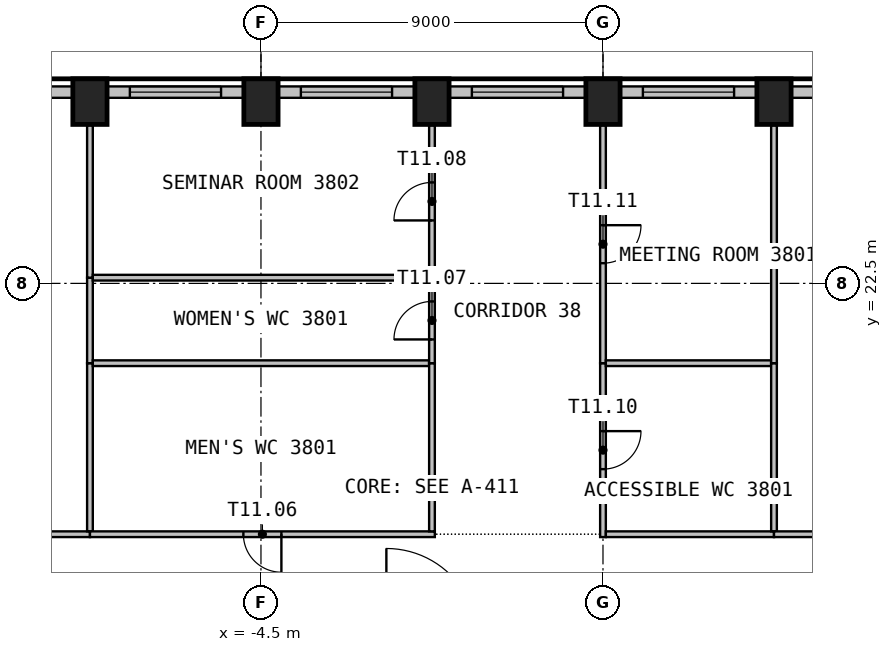
"""IFC4 building model, lengths in metres.
Left out: names, types, materials, properties, quantities, classifications, styles, units other than length and angle.
Written with IfcOpenShell. Run it as: python <this file> out.ifc"""

import sys

from ifc_helpers import new_model, si_unit, direction, frame, frame_2d, origin, origin_2d, place, context, subcontext, project, spatial, rectangle, extrude, element, fill, save


model = new_model("IFC4")
c1 = context("Model", 3, precision=1e-05, world=origin(), true_north=direction((0.0, 1.0)))
c2 = subcontext(c1, "Body", "Model", "MODEL_VIEW")
j1 = project(units=[si_unit("LENGTHUNIT", "METRE"), si_unit("PLANEANGLEUNIT", "RADIAN")], contexts=[c1])
p1 = place(None, origin())
s1 = spatial("IfcSite", under=j1, at=p1, CompositionType="ELEMENT")
p2 = place(p1, origin())
s2 = spatial("IfcBuilding", under=s1, at=p2, CompositionType="ELEMENT")
p3 = place(p2, frame((0.0, 0.0, 156.0)))
s3 = spatial("IfcBuildingStorey", under=s2, at=p3, CompositionType="ELEMENT", Elevation=156.0)
for number, where, z_axis, x_axis in (
    (1, (9.0, 27.283, 0.0), (0.0, 0.0, 1.0), (-1.0, 0.0, 0.0)),
    (2, (4.5, 27.283, 0.0), (0.0, 0.0, 1.0), (-1.0, 0.0, 0.0)),
    (3, (0.0, 27.283, 0.0), (0.0, 0.0, 1.0), (-1.0, 0.0, 0.0)),
    (4, (-4.5, 27.283, 0.0), (0.0, 0.0, 1.0), (-1.0, 0.0, 0.0)),
    (5, (-9.0, 27.283, 0.0), (0.0, 0.0, 1.0), (-1.0, 0.0, 0.0)),
):
    element("IfcColumn", number, at=place(p3, frame(where, z_axis=z_axis, x_axis=x_axis)), inside=s3, PredefinedType="COLUMN", context=c2, shape_type="SweptSolid", body=[
        extrude(rectangle(XDim=0.9, YDim=1.2, at=origin_2d()), origin(), (0.0, 0.0, 1.0), 3.575),
    ])
p4 = place(p3, frame((13.05, 27.533, 0.0), z_axis=(0.0, 0.0, 1.0), x_axis=(-1.0, 0.0, 0.0)))
e6 = element("IfcWall", 6, at=p4, inside=s3, PredefinedType="SOLIDWALL", context=c2, shape_type="SweptSolid", body=[
    extrude(rectangle(XDim=3.599, YDim=0.3, at=frame_2d((1.8, 0.0))), origin(), (0.0, 0.0, 1.0), 3.575),
])
p5 = place(p4, frame((0.6, 0.0, 0.9)))
e7 = element("IfcOpeningElement", 7, at=p5, cuts=e6, PredefinedType="OPENING", context=c2, shape_type="SweptSolid", body=[
    extrude(rectangle(XDim=2.4, YDim=2.1, at=frame_2d((1.2, 1.05))), frame((0.0, 0.16, 0.0), z_axis=(0.0, -1.0, 0.0), x_axis=(1.0, 0.0, 0.0)), (0.0, 0.0, 1.0), 0.32),
])
p6 = place(p3, frame((8.55, 27.533, 0.0), z_axis=(0.0, 0.0, 1.0), x_axis=(-1.0, 0.0, 0.0)))
e8 = element("IfcWall", 8, at=p6, inside=s3, PredefinedType="SOLIDWALL", context=c2, shape_type="SweptSolid", body=[
    extrude(rectangle(XDim=3.599, YDim=0.3, at=frame_2d((1.8, 0.0))), origin(), (0.0, 0.0, 1.0), 3.575),
])
p7 = place(p6, frame((0.6, 0.0, 0.9)))
e9 = element("IfcOpeningElement", 9, at=p7, cuts=e8, PredefinedType="OPENING", context=c2, shape_type="SweptSolid", body=[
    extrude(rectangle(XDim=2.4, YDim=2.1, at=frame_2d((1.2, 1.05))), frame((0.0, 0.16, 0.0), z_axis=(0.0, -1.0, 0.0), x_axis=(1.0, 0.0, 0.0)), (0.0, 0.0, 1.0), 0.32),
])
p8 = place(p3, frame((4.05, 27.533, 0.0), z_axis=(0.0, 0.0, 1.0), x_axis=(-1.0, 0.0, 0.0)))
e10 = element("IfcWall", 10, at=p8, inside=s3, PredefinedType="SOLIDWALL", context=c2, shape_type="SweptSolid", body=[
    extrude(rectangle(XDim=3.599, YDim=0.3, at=frame_2d((1.8, 0.0))), origin(), (0.0, 0.0, 1.0), 3.575),
])
p9 = place(p8, frame((0.6, 0.0, 0.9)))
e11 = element("IfcOpeningElement", 11, at=p9, cuts=e10, PredefinedType="OPENING", context=c2, shape_type="SweptSolid", body=[
    extrude(rectangle(XDim=2.4, YDim=2.1, at=frame_2d((1.2, 1.05))), frame((0.0, 0.16, 0.0), z_axis=(0.0, -1.0, 0.0), x_axis=(1.0, 0.0, 0.0)), (0.0, 0.0, 1.0), 0.32),
])
p10 = place(p3, frame((-0.45, 27.533, 0.0), z_axis=(0.0, 0.0, 1.0), x_axis=(-1.0, 0.0, 0.0)))
e12 = element("IfcWall", 12, at=p10, inside=s3, PredefinedType="SOLIDWALL", context=c2, shape_type="SweptSolid", body=[
    extrude(rectangle(XDim=3.599, YDim=0.3, at=frame_2d((1.8, 0.0))), origin(), (0.0, 0.0, 1.0), 3.575),
])
p11 = place(p10, frame((0.6, 0.0, 0.9)))
e13 = element("IfcOpeningElement", 13, at=p11, cuts=e12, PredefinedType="OPENING", context=c2, shape_type="SweptSolid", body=[
    extrude(rectangle(XDim=2.4, YDim=2.1, at=frame_2d((1.2, 1.05))), frame((0.0, 0.16, 0.0), z_axis=(0.0, -1.0, 0.0), x_axis=(1.0, 0.0, 0.0)), (0.0, 0.0, 1.0), 0.32),
])
p12 = place(p3, frame((-4.95, 27.533, 0.0), z_axis=(0.0, 0.0, 1.0), x_axis=(-1.0, 0.0, 0.0)))
e14 = element("IfcWall", 14, at=p12, inside=s3, PredefinedType="SOLIDWALL", context=c2, shape_type="SweptSolid", body=[
    extrude(rectangle(XDim=3.599, YDim=0.3, at=frame_2d((1.8, 0.0))), origin(), (0.0, 0.0, 1.0), 3.575),
])
p13 = place(p12, frame((0.6, 0.0, 0.9)))
e15 = element("IfcOpeningElement", 15, at=p13, cuts=e14, PredefinedType="OPENING", context=c2, shape_type="SweptSolid", body=[
    extrude(rectangle(XDim=2.4, YDim=2.1, at=frame_2d((1.2, 1.05))), frame((0.0, 0.16, 0.0), z_axis=(0.0, -1.0, 0.0), x_axis=(1.0, 0.0, 0.0)), (0.0, 0.0, 1.0), 0.32),
])
p14 = place(p3, frame((-9.45, 27.533, 0.0), z_axis=(0.0, 0.0, 1.0), x_axis=(-1.0, 0.0, 0.0)))
e16 = element("IfcWall", 16, at=p14, inside=s3, PredefinedType="SOLIDWALL", context=c2, shape_type="SweptSolid", body=[
    extrude(rectangle(XDim=3.599, YDim=0.3, at=frame_2d((1.8, 0.0))), origin(), (0.0, 0.0, 1.0), 3.575),
])
p15 = place(p14, frame((0.6, 0.0, 0.9)))
e17 = element("IfcOpeningElement", 17, at=p15, cuts=e16, PredefinedType="OPENING", context=c2, shape_type="SweptSolid", body=[
    extrude(rectangle(XDim=2.4, YDim=2.1, at=frame_2d((1.2, 1.05))), frame((0.0, 0.16, 0.0), z_axis=(0.0, -1.0, 0.0), x_axis=(1.0, 0.0, 0.0)), (0.0, 0.0, 1.0), 0.32),
])
p16 = place(p3, frame((-9.0, 15.9, 0.0), z_axis=(0.0, 0.0, 1.0), x_axis=(-1.0, 0.0, 0.0)))
e18 = element("IfcWall", 18, at=p16, inside=s3, PredefinedType="PARTITIONING", context=c2, shape_type="SweptSolid", body=[
    extrude(rectangle(XDim=5.04, YDim=0.15, at=frame_2d((2.52, 0.0))), origin(), (0.0, 0.0, 1.0), 3.575),
])
p17 = place(p16, frame((2.02, 0.0, 0.0)))
e19 = element("IfcOpeningElement", 19, at=p17, cuts=e18, PredefinedType="OPENING", context=c2, shape_type="SweptSolid", body=[
    extrude(rectangle(XDim=1.0, YDim=2.1, at=frame_2d((0.5, 1.05))), frame((0.0, 0.085, 0.0), z_axis=(0.0, -1.0, 0.0), x_axis=(1.0, 0.0, 0.0)), (0.0, 0.0, 1.0), 0.17),
])
p18 = place(p3, frame((-9.0, 20.4, 0.0), z_axis=(0.0, 0.0, 1.0), x_axis=(0.0, -1.0, 0.0)))
e20 = element("IfcWall", 20, at=p18, inside=s3, PredefinedType="PARTITIONING", context=c2, shape_type="SweptSolid", body=[
    extrude(rectangle(XDim=4.425, YDim=0.15, at=frame_2d((2.212, 0.0))), origin(), (0.0, 0.0, 1.0), 3.575),
])
p19 = place(p3, frame((0.075, 15.9, 0.0), z_axis=(0.0, 0.0, 1.0), x_axis=(-1.0, 0.0, 0.0)))
e21 = element("IfcWall", 21, at=p19, inside=s3, PredefinedType="PARTITIONING", context=c2, shape_type="SweptSolid", body=[
    extrude(rectangle(XDim=9.075, YDim=0.15, at=frame_2d((4.538, 0.0))), origin(), (0.0, 0.0, 1.0), 3.575),
])
p20 = place(p19, frame((4.038, 0.0, 0.0)))
e22 = element("IfcOpeningElement", 22, at=p20, cuts=e21, PredefinedType="OPENING", context=c2, shape_type="SweptSolid", body=[
    extrude(rectangle(XDim=1.0, YDim=2.1, at=frame_2d((0.5, 1.05))), frame((0.0, 0.085, 0.0), z_axis=(0.0, -1.0, 0.0), x_axis=(1.0, 0.0, 0.0)), (0.0, 0.0, 1.0), 0.17),
])
p21 = place(p3, frame((-9.0, 22.65, 0.0), z_axis=(0.0, 0.0, 1.0), x_axis=(0.0, -1.0, 0.0)))
e23 = element("IfcWall", 23, at=p21, inside=s3, PredefinedType="PARTITIONING", context=c2, shape_type="SweptSolid", body=[
    extrude(rectangle(XDim=2.25, YDim=0.15, at=frame_2d((1.125, 0.0))), origin(), (0.0, 0.0, 1.0), 3.575),
])
p22 = place(p3, frame((-8.925, 20.4, 0.0), z_axis=(0.0, 0.0, 1.0), x_axis=(1.0, 0.0, 0.0)))
e24 = element("IfcWall", 24, at=p22, inside=s3, PredefinedType="PARTITIONING", context=c2, shape_type="SweptSolid", body=[
    extrude(rectangle(XDim=8.85, YDim=0.15, at=frame_2d((4.425, 0.0))), origin(), (0.0, 0.0, 1.0), 3.575),
])
p23 = place(p3, frame((-9.0, 26.663, 0.0), z_axis=(0.0, 0.0, 1.0), x_axis=(0.0, -1.0, 0.0)))
e25 = element("IfcWall", 25, at=p23, inside=s3, PredefinedType="MOVABLE", context=c2, shape_type="SweptSolid", body=[
    extrude(rectangle(XDim=4.013, YDim=0.15, at=frame_2d((2.006, 0.0))), origin(), (0.0, 0.0, 1.0), 3.575),
])
p24 = place(p3, frame((-8.925, 22.65, 0.0), z_axis=(0.0, 0.0, 1.0), x_axis=(1.0, 0.0, 0.0)))
e26 = element("IfcWall", 26, at=p24, inside=s3, PredefinedType="PARTITIONING", context=c2, shape_type="SweptSolid", body=[
    extrude(rectangle(XDim=8.85, YDim=0.15, at=frame_2d((4.425, 0.0))), origin(), (0.0, 0.0, 1.0), 3.575),
])
p25 = place(p3, frame((0.0, 15.975, 0.0), z_axis=(0.0, 0.0, 1.0), x_axis=(0.0, 1.0, 0.0)))
e27 = element("IfcWall", 27, at=p25, inside=s3, PredefinedType="PARTITIONING", context=c2, shape_type="SweptSolid", body=[
    extrude(rectangle(XDim=4.425, YDim=0.15, at=frame_2d((2.212, 0.0))), origin(), (0.0, 0.0, 1.0), 3.575),
])
p26 = place(p3, frame((0.0, 20.4, 0.0), z_axis=(0.0, 0.0, 1.0), x_axis=(0.0, 1.0, 0.0)))
e28 = element("IfcWall", 28, at=p26, inside=s3, PredefinedType="PARTITIONING", context=c2, shape_type="SweptSolid", body=[
    extrude(rectangle(XDim=2.25, YDim=0.15, at=frame_2d((1.125, 0.0))), origin(), (0.0, 0.0, 1.0), 3.575),
])
p27 = place(p26, frame((0.625, 0.0, 0.0)))
e29 = element("IfcOpeningElement", 29, at=p27, cuts=e28, PredefinedType="OPENING", context=c2, shape_type="SweptSolid", body=[
    extrude(rectangle(XDim=1.0, YDim=2.1, at=frame_2d((0.5, 1.05))), frame((0.0, 0.085, 0.0), z_axis=(0.0, -1.0, 0.0), x_axis=(1.0, 0.0, 0.0)), (0.0, 0.0, 1.0), 0.17),
])
p28 = place(p3, frame((0.0, 22.65, 0.0), z_axis=(0.0, 0.0, 1.0), x_axis=(0.0, 1.0, 0.0)))
e30 = element("IfcWall", 30, at=p28, inside=s3, PredefinedType="PARTITIONING", context=c2, shape_type="SweptSolid", body=[
    extrude(rectangle(XDim=4.013, YDim=0.15, at=frame_2d((2.006, 0.0))), origin(), (0.0, 0.0, 1.0), 3.575),
])
p29 = place(p28, frame((1.506, 0.0, 0.0)))
e31 = element("IfcOpeningElement", 31, at=p29, cuts=e30, PredefinedType="OPENING", context=c2, shape_type="SweptSolid", body=[
    extrude(rectangle(XDim=1.0, YDim=2.1, at=frame_2d((0.5, 1.05))), frame((0.0, 0.085, 0.0), z_axis=(0.0, -1.0, 0.0), x_axis=(1.0, 0.0, 0.0)), (0.0, 0.0, 1.0), 0.17),
])
p30 = place(p3, frame((4.5, 20.4, 0.0), z_axis=(0.0, 0.0, 1.0), x_axis=(0.0, -1.0, 0.0)))
e32 = element("IfcWall", 32, at=p30, inside=s3, PredefinedType="PARTITIONING", context=c2, shape_type="SweptSolid", body=[
    extrude(rectangle(XDim=4.575, YDim=0.15, at=frame_2d((2.288, 0.0))), origin(), (0.0, 0.0, 1.0), 3.575),
])
p31 = place(p30, frame((1.788, 0.0, 0.0)))
e33 = element("IfcOpeningElement", 33, at=p31, cuts=e32, PredefinedType="OPENING", context=c2, shape_type="SweptSolid", body=[
    extrude(rectangle(XDim=1.0, YDim=2.1, at=frame_2d((0.5, 1.05))), frame((0.0, 0.085, 0.0), z_axis=(0.0, -1.0, 0.0), x_axis=(1.0, 0.0, 0.0)), (0.0, 0.0, 1.0), 0.17),
])
p32 = place(p3, frame((9.0, 15.9, 0.0), z_axis=(0.0, 0.0, 1.0), x_axis=(-1.0, 0.0, 0.0)))
e34 = element("IfcWall", 34, at=p32, inside=s3, PredefinedType="PARTITIONING", context=c2, shape_type="SweptSolid", body=[
    extrude(rectangle(XDim=4.425, YDim=0.15, at=frame_2d((2.212, 0.0))), origin(), (0.0, 0.0, 1.0), 3.575),
])
p33 = place(p3, frame((4.5, 26.663, 0.0), z_axis=(0.0, 0.0, 1.0), x_axis=(0.0, -1.0, 0.0)))
e35 = element("IfcWall", 35, at=p33, inside=s3, PredefinedType="PARTITIONING", context=c2, shape_type="SweptSolid", body=[
    extrude(rectangle(XDim=6.263, YDim=0.15, at=frame_2d((3.131, 0.0))), origin(), (0.0, 0.0, 1.0), 3.575),
])
p34 = place(p33, frame((2.631, 0.0, 0.0)))
e36 = element("IfcOpeningElement", 36, at=p34, cuts=e35, PredefinedType="OPENING", context=c2, shape_type="SweptSolid", body=[
    extrude(rectangle(XDim=1.0, YDim=2.1, at=frame_2d((0.5, 1.05))), frame((0.0, 0.085, 0.0), z_axis=(0.0, -1.0, 0.0), x_axis=(1.0, 0.0, 0.0)), (0.0, 0.0, 1.0), 0.17),
])
p35 = place(p3, frame((4.575, 20.4, 0.0), z_axis=(0.0, 0.0, 1.0), x_axis=(1.0, 0.0, 0.0)))
e37 = element("IfcWall", 37, at=p35, inside=s3, PredefinedType="PARTITIONING", context=c2, shape_type="SweptSolid", body=[
    extrude(rectangle(XDim=4.35, YDim=0.15, at=frame_2d((2.175, 0.0))), origin(), (0.0, 0.0, 1.0), 3.575),
])
p36 = place(p3, frame((9.0, 20.4, 0.0), z_axis=(0.0, 0.0, 1.0), x_axis=(0.0, -1.0, 0.0)))
e38 = element("IfcWall", 38, at=p36, inside=s3, PredefinedType="PARTITIONING", context=c2, shape_type="SweptSolid", body=[
    extrude(rectangle(XDim=4.425, YDim=0.15, at=frame_2d((2.212, 0.0))), origin(), (0.0, 0.0, 1.0), 3.575),
])
p37 = place(p3, frame((14.789, 15.9, 0.0), z_axis=(0.0, 0.0, 1.0), x_axis=(-1.0, 0.0, 0.0)))
e39 = element("IfcWall", 39, at=p37, inside=s3, PredefinedType="PARTITIONING", context=c2, shape_type="SweptSolid", body=[
    extrude(rectangle(XDim=5.789, YDim=0.15, at=frame_2d((2.895, 0.0))), origin(), (0.0, 0.0, 1.0), 3.575),
])
p38 = place(p37, frame((2.395, 0.0, 0.0)))
e40 = element("IfcOpeningElement", 40, at=p38, cuts=e39, PredefinedType="OPENING", context=c2, shape_type="SweptSolid", body=[
    extrude(rectangle(XDim=1.0, YDim=2.1, at=frame_2d((0.5, 1.05))), frame((0.0, 0.085, 0.0), z_axis=(0.0, -1.0, 0.0), x_axis=(1.0, 0.0, 0.0)), (0.0, 0.0, 1.0), 0.17),
])
p39 = place(p3, frame((9.0, 26.663, 0.0), z_axis=(0.0, 0.0, 1.0), x_axis=(0.0, -1.0, 0.0)))
e41 = element("IfcWall", 41, at=p39, inside=s3, PredefinedType="PARTITIONING", context=c2, shape_type="SweptSolid", body=[
    extrude(rectangle(XDim=6.263, YDim=0.15, at=frame_2d((3.131, 0.0))), origin(), (0.0, 0.0, 1.0), 3.575),
])
p40 = place(p7, origin())
e42 = element("IfcWindow", 42, at=p40, inside=s3, PartitioningType="SINGLE_PANEL", PredefinedType="WINDOW", context=c2, shape_type="SweptSolid", body=[
    extrude(rectangle(XDim=2.4, YDim=2.1, at=frame_2d((1.2, 1.05))), frame((0.0, 0.03, 0.0), z_axis=(0.0, -1.0, 0.0), x_axis=(1.0, 0.0, 0.0)), (0.0, 0.0, 1.0), 0.06),
])
fill(e9, e42)
p41 = place(p9, origin())
e43 = element("IfcWindow", 43, at=p41, inside=s3, PartitioningType="SINGLE_PANEL", PredefinedType="WINDOW", context=c2, shape_type="SweptSolid", body=[
    extrude(rectangle(XDim=2.4, YDim=2.1, at=frame_2d((1.2, 1.05))), frame((0.0, 0.03, 0.0), z_axis=(0.0, -1.0, 0.0), x_axis=(1.0, 0.0, 0.0)), (0.0, 0.0, 1.0), 0.06),
])
fill(e11, e43)
p42 = place(p11, origin())
e44 = element("IfcWindow", 44, at=p42, inside=s3, PartitioningType="SINGLE_PANEL", PredefinedType="WINDOW", context=c2, shape_type="SweptSolid", body=[
    extrude(rectangle(XDim=2.4, YDim=2.1, at=frame_2d((1.2, 1.05))), frame((0.0, 0.03, 0.0), z_axis=(0.0, -1.0, 0.0), x_axis=(1.0, 0.0, 0.0)), (0.0, 0.0, 1.0), 0.06),
])
fill(e13, e44)
p43 = place(p13, origin())
e45 = element("IfcWindow", 45, at=p43, inside=s3, PartitioningType="SINGLE_PANEL", PredefinedType="WINDOW", context=c2, shape_type="SweptSolid", body=[
    extrude(rectangle(XDim=2.4, YDim=2.1, at=frame_2d((1.2, 1.05))), frame((0.0, 0.03, 0.0), z_axis=(0.0, -1.0, 0.0), x_axis=(1.0, 0.0, 0.0)), (0.0, 0.0, 1.0), 0.06),
])
fill(e15, e45)
p44 = place(p20, origin())
e46 = element("IfcDoor", 46, at=p44, inside=s3, OperationType="SINGLE_SWING_RIGHT", PredefinedType="DOOR", context=c2, shape_type="SweptSolid", body=[
    extrude(rectangle(XDim=1.0, YDim=2.1, at=frame_2d((0.5, 1.05))), frame((0.0, 0.025, 0.0), z_axis=(0.0, -1.0, 0.0), x_axis=(1.0, 0.0, 0.0)), (0.0, 0.0, 1.0), 0.05),
])
fill(e22, e46)
p45 = place(p27, origin())
e47 = element("IfcDoor", 47, at=p45, inside=s3, OperationType="SINGLE_SWING_LEFT", PredefinedType="DOOR", context=c2, shape_type="SweptSolid", body=[
    extrude(rectangle(XDim=1.0, YDim=2.1, at=frame_2d((0.5, 1.05))), frame((0.0, 0.025, 0.0), z_axis=(0.0, -1.0, 0.0), x_axis=(1.0, 0.0, 0.0)), (0.0, 0.0, 1.0), 0.05),
])
fill(e29, e47)
p46 = place(p29, origin())
e48 = element("IfcDoor", 48, at=p46, inside=s3, OperationType="SINGLE_SWING_RIGHT", PredefinedType="DOOR", context=c2, shape_type="SweptSolid", body=[
    extrude(rectangle(XDim=1.0, YDim=2.1, at=frame_2d((0.5, 1.05))), frame((0.0, 0.025, 0.0), z_axis=(0.0, -1.0, 0.0), x_axis=(1.0, 0.0, 0.0)), (0.0, 0.0, 1.0), 0.05),
])
fill(e31, e48)
p47 = place(p31, origin())
e49 = element("IfcDoor", 49, at=p47, inside=s3, OperationType="SINGLE_SWING_RIGHT", PredefinedType="DOOR", context=c2, shape_type="SweptSolid", body=[
    extrude(rectangle(XDim=1.0, YDim=2.1, at=frame_2d((0.5, 1.05))), frame((0.0, 0.025, 0.0), z_axis=(0.0, -1.0, 0.0), x_axis=(1.0, 0.0, 0.0)), (0.0, 0.0, 1.0), 0.05),
])
fill(e33, e49)
p48 = place(p34, origin())
e50 = element("IfcDoor", 50, at=p48, inside=s3, OperationType="SINGLE_SWING_RIGHT", PredefinedType="DOOR", context=c2, shape_type="SweptSolid", body=[
    extrude(rectangle(XDim=1.0, YDim=2.1, at=frame_2d((0.5, 1.05))), frame((0.0, 0.025, 0.0), z_axis=(0.0, -1.0, 0.0), x_axis=(1.0, 0.0, 0.0)), (0.0, 0.0, 1.0), 0.05),
])
fill(e36, e50)
save(model, sys.argv[1])
